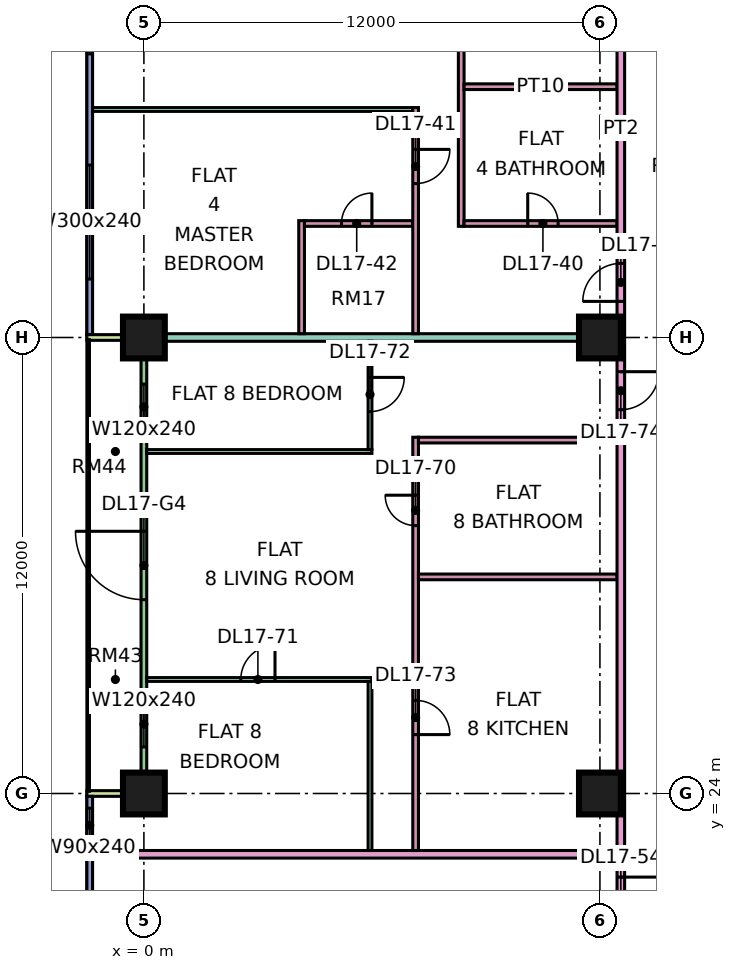
"""IFC4 building model, lengths in metres.
Left out: names, types, materials, properties, quantities, classifications, styles, units other than length and angle.
Written with IfcOpenShell. Run it as: python <this file> out.ifc"""

import sys

from ifc_helpers import new_model, si_unit, direction, frame, frame_2d, origin, origin_2d, place, context, subcontext, project, spatial, rectangle, extrude, element, fill, save


model = new_model("IFC4")
c1 = context("Model", 3, precision=1e-05, world=origin(), true_north=direction((0.0, 1.0)))
c2 = subcontext(c1, "Body", "Model", "MODEL_VIEW")
j1 = project(units=[si_unit("LENGTHUNIT", "METRE"), si_unit("PLANEANGLEUNIT", "RADIAN")], contexts=[c1])
p1 = place(None, origin())
s1 = spatial("IfcSite", under=j1, at=p1, CompositionType="ELEMENT")
p2 = place(p1, origin())
s2 = spatial("IfcBuilding", under=s1, at=p2, CompositionType="ELEMENT")
p3 = place(p2, frame((0.0, 0.0, 78.9)))
s3 = spatial("IfcBuildingStorey", under=s2, at=p3, CompositionType="ELEMENT", Elevation=78.9)
p4 = place(p3, frame((0.0, 24.0, 0.0), z_axis=(0.0, 0.0, 1.0), x_axis=(1.0, 0.0, 0.0)))
e1 = element("IfcColumn", 1, at=p4, inside=s3, PredefinedType="COLUMN", context=c2, shape_type="SweptSolid", body=[
    extrude(rectangle(XDim=1.1, YDim=1.1, at=origin_2d()), origin(), (0.0, 0.0, 1.0), 3.75),
])
p5 = place(p3, frame((0.0, 36.0, 0.0), z_axis=(0.0, 0.0, 1.0), x_axis=(1.0, 0.0, 0.0)))
e2 = element("IfcColumn", 2, at=p5, inside=s3, PredefinedType="COLUMN", context=c2, shape_type="SweptSolid", body=[
    extrude(rectangle(XDim=1.1, YDim=1.1, at=origin_2d()), origin(), (0.0, 0.0, 1.0), 3.75),
])
for number, where, z_axis, x_axis in (
    (3, (12.0, 24.0, 0.0), (0.0, 0.0, 1.0), (1.0, 0.0, 0.0)),
    (4, (12.0, 36.0, 0.0), (0.0, 0.0, 1.0), (1.0, 0.0, 0.0)),
):
    element("IfcColumn", number, at=place(p3, frame(where, z_axis=z_axis, x_axis=x_axis)), inside=s3, PredefinedType="COLUMN", context=c2, shape_type="SweptSolid", body=[
        extrude(rectangle(XDim=1.1, YDim=1.1, at=origin_2d()), origin(), (0.0, 0.0, 1.0), 3.75),
    ])
p6 = place(p3, frame((-1.425, 47.925, 0.0), z_axis=(0.0, 0.0, 1.0), x_axis=(0.0, -1.0, 0.0)))
e5 = element("IfcWall", 5, at=p6, inside=s3, PredefinedType="SOLIDWALL", context=c2, shape_type="SweptSolid", body=[
    extrude(rectangle(XDim=11.85, YDim=0.15, at=frame_2d((5.925, 0.0))), origin(), (0.0, 0.0, 1.0), 3.35),
])
p7 = place(p6, frame((1.462, 0.0, 0.45)))
e6 = element("IfcOpeningElement", 6, at=p7, cuts=e5, PredefinedType="OPENING", context=c2, shape_type="SweptSolid", body=[
    extrude(rectangle(XDim=3.0, YDim=2.4, at=frame_2d((1.5, 1.2))), frame((0.0, 0.085, 0.0), z_axis=(0.0, -1.0, 0.0), x_axis=(1.0, 0.0, 0.0)), (0.0, 0.0, 1.0), 0.17),
])
p8 = place(p6, frame((7.387, 0.0, 0.45)))
e7 = element("IfcOpeningElement", 7, at=p8, cuts=e5, PredefinedType="OPENING", context=c2, shape_type="SweptSolid", body=[
    extrude(rectangle(XDim=3.0, YDim=2.4, at=frame_2d((1.5, 1.2))), frame((0.0, 0.085, 0.0), z_axis=(0.0, -1.0, 0.0), x_axis=(1.0, 0.0, 0.0)), (0.0, 0.0, 1.0), 0.17),
])
p9 = place(p3, frame((0.0, 35.925, 0.0), z_axis=(0.0, 0.0, 1.0), x_axis=(0.0, -1.0, 0.0)))
e8 = element("IfcWall", 8, at=p9, inside=s3, PredefinedType="SOLIDWALL", context=c2, shape_type="SweptSolid", body=[
    extrude(rectangle(XDim=11.85, YDim=0.15, at=frame_2d((5.925, 0.0))), origin(), (0.0, 0.0, 1.0), 3.35),
])
p10 = place(p9, frame((1.15, 0.0, 0.45)))
e9 = element("IfcOpeningElement", 9, at=p10, cuts=e8, PredefinedType="OPENING", context=c2, shape_type="SweptSolid", body=[
    extrude(rectangle(XDim=1.2, YDim=2.4, at=frame_2d((0.6, 1.2))), frame((0.0, 0.085, 0.0), z_axis=(0.0, -1.0, 0.0), x_axis=(1.0, 0.0, 0.0)), (0.0, 0.0, 1.0), 0.17),
])
p11 = place(p9, frame((5.025, 0.0, 0.0)))
e10 = element("IfcOpeningElement", 10, at=p11, cuts=e8, PredefinedType="OPENING", context=c2, shape_type="SweptSolid", body=[
    extrude(rectangle(XDim=1.8, YDim=2.4, at=frame_2d((0.9, 1.2))), frame((0.0, 0.085, 0.0), z_axis=(0.0, -1.0, 0.0), x_axis=(1.0, 0.0, 0.0)), (0.0, 0.0, 1.0), 0.17),
])
p12 = place(p9, frame((9.5, 0.0, 0.45)))
e11 = element("IfcOpeningElement", 11, at=p12, cuts=e8, PredefinedType="OPENING", context=c2, shape_type="SweptSolid", body=[
    extrude(rectangle(XDim=1.2, YDim=2.4, at=frame_2d((0.6, 1.2))), frame((0.0, 0.085, 0.0), z_axis=(0.0, -1.0, 0.0), x_axis=(1.0, 0.0, 0.0)), (0.0, 0.0, 1.0), 0.17),
])
for number, where, z_axis, x_axis in (
    (12, (-1.5, 36.0, 0.0), (0.0, 0.0, 1.0), (1.0, 0.0, 0.0)),
    (13, (-1.5, 24.0, 0.0), (0.0, 0.0, 1.0), (1.0, 0.0, 0.0)),
):
    element("IfcWall", number, at=place(p3, frame(where, z_axis=z_axis, x_axis=x_axis)), inside=s3, PredefinedType="SOLIDWALL", context=c2, shape_type="SweptSolid", body=[
        extrude(rectangle(XDim=1.5, YDim=0.15, at=frame_2d((0.75, 0.0))), origin(), (0.0, 0.0, 1.0), 3.35),
    ])
p13 = place(p3, frame((-1.425, 23.925, 0.0), z_axis=(0.0, 0.0, 1.0), x_axis=(0.0, -1.0, 0.0)))
e14 = element("IfcWall", 14, at=p13, inside=s3, PredefinedType="SOLIDWALL", context=c2, shape_type="SweptSolid", body=[
    extrude(rectangle(XDim=11.425, YDim=0.15, at=frame_2d((5.712, 0.0))), origin(), (0.0, 0.0, 1.0), 3.35),
])
p14 = place(p13, frame((0.312, 0.0, 0.45)))
e15 = element("IfcOpeningElement", 15, at=p14, cuts=e14, PredefinedType="OPENING", context=c2, shape_type="SweptSolid", body=[
    extrude(rectangle(XDim=0.9, YDim=2.4, at=frame_2d((0.45, 1.2))), frame((0.0, 0.085, 0.0), z_axis=(0.0, -1.0, 0.0), x_axis=(1.0, 0.0, 0.0)), (0.0, 0.0, 1.0), 0.17),
])
p15 = place(p13, frame((6.175, 0.0, 0.45)))
e16 = element("IfcOpeningElement", 16, at=p15, cuts=e14, PredefinedType="OPENING", context=c2, shape_type="SweptSolid", body=[
    extrude(rectangle(XDim=3.0, YDim=2.4, at=frame_2d((1.5, 1.2))), frame((0.0, 0.085, 0.0), z_axis=(0.0, -1.0, 0.0), x_axis=(1.0, 0.0, 0.0)), (0.0, 0.0, 1.0), 0.17),
])
p16 = place(p3, frame((-1.35, 22.4, 0.0), z_axis=(0.0, 0.0, 1.0), x_axis=(1.0, 0.0, 0.0)))
e17 = element("IfcWall", 17, at=p16, inside=s3, PredefinedType="PARTITIONING", context=c2, shape_type="SweptSolid", body=[
    extrude(rectangle(XDim=13.8, YDim=0.2, at=frame_2d((6.9, 0.0))), origin(), (0.0, 0.0, 1.0), 3.35),
])
e18 = element("IfcWall", 18, at=p5, inside=s3, PredefinedType="PARTITIONING", context=c2, shape_type="SweptSolid", body=[
    extrude(rectangle(XDim=12.45, YDim=0.2, at=frame_2d((6.225, 0.0))), origin(), (0.0, 0.0, 1.0), 3.35),
])
p17 = place(p3, frame((-1.35, 42.0, 0.0), z_axis=(0.0, 0.0, 1.0), x_axis=(1.0, 0.0, 0.0)))
e19 = element("IfcWall", 19, at=p17, inside=s3, PredefinedType="PARTITIONING", context=c2, shape_type="SweptSolid", body=[
    extrude(rectangle(XDim=8.425, YDim=0.1, at=frame_2d((4.212, 0.0))), origin(), (0.0, 0.0, 1.0), 3.35),
])
p18 = place(p3, frame((0.074, 27.0, 0.0), z_axis=(0.0, 0.0, 1.0), x_axis=(1.0, 0.0, 0.0)))
e20 = element("IfcWall", 20, at=p18, inside=s3, PredefinedType="PARTITIONING", context=c2, shape_type="SweptSolid", body=[
    extrude(rectangle(XDim=5.926, YDim=0.1, at=frame_2d((2.963, 0.0))), origin(), (0.0, 0.0, 1.0), 3.35),
])
p19 = place(p18, frame((2.476, 0.0, 0.0)))
e21 = element("IfcOpeningElement", 21, at=p19, cuts=e20, PredefinedType="OPENING", context=c2, shape_type="SweptSolid", body=[
    extrude(rectangle(XDim=0.9, YDim=2.1, at=frame_2d((0.45, 1.05))), frame((0.0, 0.06, 0.0), z_axis=(0.0, -1.0, 0.0), x_axis=(1.0, 0.0, 0.0)), (0.0, 0.0, 1.0), 0.12),
])
p20 = place(p3, frame((0.074, 33.0, 0.0), z_axis=(0.0, 0.0, 1.0), x_axis=(1.0, 0.0, 0.0)))
e22 = element("IfcWall", 22, at=p20, inside=s3, PredefinedType="PARTITIONING", context=c2, shape_type="SweptSolid", body=[
    extrude(rectangle(XDim=5.926, YDim=0.1, at=frame_2d((2.963, 0.0))), origin(), (0.0, 0.0, 1.0), 3.35),
])
p21 = place(p3, frame((4.15, 36.1, 0.0), z_axis=(0.0, 0.0, 1.0), x_axis=(0.0, 1.0, 0.0)))
e23 = element("IfcWall", 23, at=p21, inside=s3, PredefinedType="PARTITIONING", context=c2, shape_type="SweptSolid", body=[
    extrude(rectangle(XDim=2.975, YDim=0.15, at=frame_2d((1.487, 0.0))), origin(), (0.0, 0.0, 1.0), 3.35),
])
p22 = place(p3, frame((4.225, 39.0, 0.0), z_axis=(0.0, 0.0, 1.0), x_axis=(1.0, 0.0, 0.0)))
e24 = element("IfcWall", 24, at=p22, inside=s3, PredefinedType="PARTITIONING", context=c2, shape_type="SweptSolid", body=[
    extrude(rectangle(XDim=2.85, YDim=0.15, at=frame_2d((1.425, 0.0))), origin(), (0.0, 0.0, 1.0), 3.35),
])
p23 = place(p22, frame((0.975, 0.0, 0.0)))
e25 = element("IfcOpeningElement", 25, at=p23, cuts=e24, PredefinedType="OPENING", context=c2, shape_type="SweptSolid", body=[
    extrude(rectangle(XDim=0.8, YDim=2.1, at=frame_2d((0.4, 1.05))), frame((0.0, 0.085, 0.0), z_axis=(0.0, -1.0, 0.0), x_axis=(1.0, 0.0, 0.0)), (0.0, 0.0, 1.0), 0.17),
])
p24 = place(p3, frame((5.95, 22.5, 0.0), z_axis=(0.0, 0.0, 1.0), x_axis=(0.0, 1.0, 0.0)))
e26 = element("IfcWall", 26, at=p24, inside=s3, PredefinedType="PARTITIONING", context=c2, shape_type="SweptSolid", body=[
    extrude(rectangle(XDim=4.45, YDim=0.1, at=frame_2d((2.225, 0.0))), origin(), (0.0, 0.0, 1.0), 3.35),
])
p25 = place(p3, frame((5.95, 33.05, 0.0), z_axis=(0.0, 0.0, 1.0), x_axis=(0.0, 1.0, 0.0)))
e27 = element("IfcWall", 27, at=p25, inside=s3, PredefinedType="PARTITIONING", context=c2, shape_type="SweptSolid", body=[
    extrude(rectangle(XDim=2.85, YDim=0.1, at=frame_2d((1.425, 0.0))), origin(), (0.0, 0.0, 1.0), 3.35),
])
p26 = place(p25, frame((1.0, 0.0, 0.0)))
e28 = element("IfcOpeningElement", 28, at=p26, cuts=e27, PredefinedType="OPENING", context=c2, shape_type="SweptSolid", body=[
    extrude(rectangle(XDim=0.9, YDim=2.1, at=frame_2d((0.45, 1.05))), frame((0.0, 0.06, 0.0), z_axis=(0.0, -1.0, 0.0), x_axis=(1.0, 0.0, 0.0)), (0.0, 0.0, 1.0), 0.12),
])
p27 = place(p3, frame((7.15, 22.5, 0.0), z_axis=(0.0, 0.0, 1.0), x_axis=(0.0, 1.0, 0.0)))
e29 = element("IfcWall", 29, at=p27, inside=s3, PredefinedType="PARTITIONING", context=c2, shape_type="SweptSolid", body=[
    extrude(rectangle(XDim=10.875, YDim=0.15, at=frame_2d((5.438, 0.0))), origin(), (0.0, 0.0, 1.0), 3.35),
])
p28 = place(p27, frame((8.55, 0.0, 0.0)))
e30 = element("IfcOpeningElement", 30, at=p28, cuts=e29, PredefinedType="OPENING", context=c2, shape_type="SweptSolid", body=[
    extrude(rectangle(XDim=0.8, YDim=2.1, at=frame_2d((0.4, 1.05))), frame((0.0, 0.085, 0.0), z_axis=(0.0, -1.0, 0.0), x_axis=(1.0, 0.0, 0.0)), (0.0, 0.0, 1.0), 0.17),
])
p29 = place(p27, frame((3.05, 0.0, 0.0)))
e31 = element("IfcOpeningElement", 31, at=p29, cuts=e29, PredefinedType="OPENING", context=c2, shape_type="SweptSolid", body=[
    extrude(rectangle(XDim=0.9, YDim=2.1, at=frame_2d((0.45, 1.05))), frame((0.0, 0.085, 0.0), z_axis=(0.0, -1.0, 0.0), x_axis=(1.0, 0.0, 0.0)), (0.0, 0.0, 1.0), 0.17),
])
p30 = place(p3, frame((7.15, 36.1, 0.0), z_axis=(0.0, 0.0, 1.0), x_axis=(0.0, 1.0, 0.0)))
e32 = element("IfcWall", 32, at=p30, inside=s3, PredefinedType="PARTITIONING", context=c2, shape_type="SweptSolid", body=[
    extrude(rectangle(XDim=5.95, YDim=0.15, at=frame_2d((2.975, 0.0))), origin(), (0.0, 0.0, 1.0), 3.35),
])
p31 = place(p30, frame((3.95, 0.0, 0.0)))
e33 = element("IfcOpeningElement", 33, at=p31, cuts=e32, PredefinedType="OPENING", context=c2, shape_type="SweptSolid", body=[
    extrude(rectangle(XDim=0.9, YDim=2.1, at=frame_2d((0.45, 1.05))), frame((0.0, 0.085, 0.0), z_axis=(0.0, -1.0, 0.0), x_axis=(1.0, 0.0, 0.0)), (0.0, 0.0, 1.0), 0.17),
])
for number, where, z_axis, x_axis in (
    (34, (7.225, 29.7, 0.0), (0.0, 0.0, 1.0), (1.0, 0.0, 0.0)),
    (35, (7.225, 33.3, 0.0), (0.0, 0.0, 1.0), (1.0, 0.0, 0.0)),
):
    element("IfcWall", number, at=place(p3, frame(where, z_axis=z_axis, x_axis=x_axis)), inside=s3, PredefinedType="PARTITIONING", context=c2, shape_type="SweptSolid", body=[
        extrude(rectangle(XDim=5.225, YDim=0.15, at=frame_2d((2.612, 0.0))), origin(), (0.0, 0.0, 1.0), 3.35),
    ])
p32 = place(p3, frame((8.35, 38.925, 0.0), z_axis=(0.0, 0.0, 1.0), x_axis=(0.0, 1.0, 0.0)))
e36 = element("IfcWall", 36, at=p32, inside=s3, PredefinedType="PARTITIONING", context=c2, shape_type="SweptSolid", body=[
    extrude(rectangle(XDim=8.975, YDim=0.15, at=frame_2d((4.487, 0.0))), origin(), (0.0, 0.0, 1.0), 3.35),
])
p33 = place(p32, frame((5.925, 0.0, 0.0)))
e37 = element("IfcOpeningElement", 37, at=p33, cuts=e36, PredefinedType="OPENING", context=c2, shape_type="SweptSolid", body=[
    extrude(rectangle(XDim=0.9, YDim=2.1, at=frame_2d((0.45, 1.05))), frame((0.0, 0.085, 0.0), z_axis=(0.0, -1.0, 0.0), x_axis=(1.0, 0.0, 0.0)), (0.0, 0.0, 1.0), 0.17),
])
p34 = place(p3, frame((8.425, 39.0, 0.0), z_axis=(0.0, 0.0, 1.0), x_axis=(1.0, 0.0, 0.0)))
e38 = element("IfcWall", 38, at=p34, inside=s3, PredefinedType="PARTITIONING", context=c2, shape_type="SweptSolid", body=[
    extrude(rectangle(XDim=4.025, YDim=0.15, at=frame_2d((2.012, 0.0))), origin(), (0.0, 0.0, 1.0), 3.35),
])
p35 = place(p34, frame((1.675, 0.0, 0.0)))
e39 = element("IfcOpeningElement", 39, at=p35, cuts=e38, PredefinedType="OPENING", context=c2, shape_type="SweptSolid", body=[
    extrude(rectangle(XDim=0.8, YDim=2.1, at=frame_2d((0.4, 1.05))), frame((0.0, 0.085, 0.0), z_axis=(0.0, -1.0, 0.0), x_axis=(1.0, 0.0, 0.0)), (0.0, 0.0, 1.0), 0.17),
])
p36 = place(p3, frame((8.425, 42.6, 0.0), z_axis=(0.0, 0.0, 1.0), x_axis=(1.0, 0.0, 0.0)))
e40 = element("IfcWall", 40, at=p36, inside=s3, PredefinedType="PARTITIONING", context=c2, shape_type="SweptSolid", body=[
    extrude(rectangle(XDim=4.025, YDim=0.15, at=frame_2d((2.012, 0.0))), origin(), (0.0, 0.0, 1.0), 3.35),
])
p37 = place(p3, frame((12.55, 20.0, 0.0), z_axis=(0.0, 0.0, 1.0), x_axis=(0.0, 1.0, 0.0)))
e41 = element("IfcWall", 41, at=p37, inside=s3, PredefinedType="PARTITIONING", context=c2, shape_type="SweptSolid", body=[
    extrude(rectangle(XDim=43.0, YDim=0.2, at=frame_2d((21.5, 0.0))), origin(), (0.0, 0.0, 1.0), 3.35),
])
p38 = place(p37, frame((16.95, 0.0, 0.0)))
e42 = element("IfcOpeningElement", 42, at=p38, cuts=e41, PredefinedType="OPENING", context=c2, shape_type="SweptSolid", body=[
    extrude(rectangle(XDim=1.0, YDim=2.1, at=frame_2d((0.5, 1.05))), frame((0.0, 0.11, 0.0), z_axis=(0.0, -1.0, 0.0), x_axis=(1.0, 0.0, 0.0)), (0.0, 0.0, 1.0), 0.22),
])
p39 = place(p37, frame((35.25, 0.0, 0.0)))
e43 = element("IfcOpeningElement", 43, at=p39, cuts=e41, PredefinedType="OPENING", context=c2, shape_type="SweptSolid", body=[
    extrude(rectangle(XDim=1.0, YDim=2.1, at=frame_2d((0.5, 1.05))), frame((0.0, 0.11, 0.0), z_axis=(0.0, -1.0, 0.0), x_axis=(1.0, 0.0, 0.0)), (0.0, 0.0, 1.0), 0.22),
])
p40 = place(p37, frame((0.6, 0.0, 0.0)))
e44 = element("IfcOpeningElement", 44, at=p40, cuts=e41, PredefinedType="OPENING", context=c2, shape_type="SweptSolid", body=[
    extrude(rectangle(XDim=1.2, YDim=2.1, at=frame_2d((0.6, 1.05))), frame((0.0, 0.11, 0.0), z_axis=(0.0, -1.0, 0.0), x_axis=(1.0, 0.0, 0.0)), (0.0, 0.0, 1.0), 0.22),
])
p41 = place(p37, frame((14.1, 0.0, 0.0)))
e45 = element("IfcOpeningElement", 45, at=p41, cuts=e41, PredefinedType="OPENING", context=c2, shape_type="SweptSolid", body=[
    extrude(rectangle(XDim=1.0, YDim=2.1, at=frame_2d((0.5, 1.05))), frame((0.0, 0.11, 0.0), z_axis=(0.0, -1.0, 0.0), x_axis=(1.0, 0.0, 0.0)), (0.0, 0.0, 1.0), 0.22),
])
p42 = place(p7, origin())
e46 = element("IfcWindow", 46, at=p42, inside=s3, PartitioningType="SINGLE_PANEL", PredefinedType="WINDOW", context=c2, shape_type="SweptSolid", body=[
    extrude(rectangle(XDim=3.0, YDim=2.4, at=frame_2d((1.5, 1.2))), frame((0.0, 0.03, 0.0), z_axis=(0.0, -1.0, 0.0), x_axis=(1.0, 0.0, 0.0)), (0.0, 0.0, 1.0), 0.06),
])
fill(e6, e46)
p43 = place(p8, origin())
e47 = element("IfcWindow", 47, at=p43, inside=s3, PartitioningType="SINGLE_PANEL", PredefinedType="WINDOW", context=c2, shape_type="SweptSolid", body=[
    extrude(rectangle(XDim=3.0, YDim=2.4, at=frame_2d((1.5, 1.2))), frame((0.0, 0.03, 0.0), z_axis=(0.0, -1.0, 0.0), x_axis=(1.0, 0.0, 0.0)), (0.0, 0.0, 1.0), 0.06),
])
fill(e7, e47)
p44 = place(p10, origin())
e48 = element("IfcWindow", 48, at=p44, inside=s3, PartitioningType="SINGLE_PANEL", PredefinedType="WINDOW", context=c2, shape_type="SweptSolid", body=[
    extrude(rectangle(XDim=1.2, YDim=2.4, at=frame_2d((0.6, 1.2))), frame((0.0, 0.03, 0.0), z_axis=(0.0, -1.0, 0.0), x_axis=(1.0, 0.0, 0.0)), (0.0, 0.0, 1.0), 0.06),
])
fill(e9, e48)
p45 = place(p11, frame((1.8, 0.0, 0.0), z_axis=(0.0, 0.0, 1.0), x_axis=(-1.0, 0.0, 0.0)))
e49 = element("IfcDoor", 49, at=p45, inside=s3, OperationType="DOUBLE_DOOR_SINGLE_SWING", PredefinedType="DOOR", context=c2, shape_type="SweptSolid", body=[
    extrude(rectangle(XDim=1.8, YDim=2.4, at=frame_2d((0.9, 1.2))), frame((0.0, 0.025, 0.0), z_axis=(0.0, -1.0, 0.0), x_axis=(1.0, 0.0, 0.0)), (0.0, 0.0, 1.0), 0.05),
])
fill(e10, e49)
p46 = place(p12, origin())
e50 = element("IfcWindow", 50, at=p46, inside=s3, PartitioningType="SINGLE_PANEL", PredefinedType="WINDOW", context=c2, shape_type="SweptSolid", body=[
    extrude(rectangle(XDim=1.2, YDim=2.4, at=frame_2d((0.6, 1.2))), frame((0.0, 0.03, 0.0), z_axis=(0.0, -1.0, 0.0), x_axis=(1.0, 0.0, 0.0)), (0.0, 0.0, 1.0), 0.06),
])
fill(e11, e50)
p47 = place(p14, origin())
e51 = element("IfcWindow", 51, at=p47, inside=s3, PartitioningType="SINGLE_PANEL", PredefinedType="WINDOW", context=c2, shape_type="SweptSolid", body=[
    extrude(rectangle(XDim=0.9, YDim=2.4, at=frame_2d((0.45, 1.2))), frame((0.0, 0.03, 0.0), z_axis=(0.0, -1.0, 0.0), x_axis=(1.0, 0.0, 0.0)), (0.0, 0.0, 1.0), 0.06),
])
fill(e15, e51)
p48 = place(p35, origin())
e52 = element("IfcDoor", 52, at=p48, inside=s3, OperationType="SINGLE_SWING_LEFT", PredefinedType="DOOR", context=c2, shape_type="SweptSolid", body=[
    extrude(rectangle(XDim=0.8, YDim=2.1, at=frame_2d((0.4, 1.05))), frame((0.0, 0.025, 0.0), z_axis=(0.0, -1.0, 0.0), x_axis=(1.0, 0.0, 0.0)), (0.0, 0.0, 1.0), 0.05),
])
fill(e39, e52)
p49 = place(p31, origin())
e53 = element("IfcDoor", 53, at=p49, inside=s3, OperationType="SINGLE_SWING_RIGHT", PredefinedType="DOOR", context=c2, shape_type="SweptSolid", body=[
    extrude(rectangle(XDim=0.9, YDim=2.1, at=frame_2d((0.45, 1.05))), frame((0.0, 0.025, 0.0), z_axis=(0.0, -1.0, 0.0), x_axis=(1.0, 0.0, 0.0)), (0.0, 0.0, 1.0), 0.05),
])
fill(e33, e53)
p50 = place(p23, frame((0.8, 0.0, 0.0), z_axis=(0.0, 0.0, 1.0), x_axis=(-1.0, 0.0, 0.0)))
e54 = element("IfcDoor", 54, at=p50, inside=s3, OperationType="SINGLE_SWING_RIGHT", PredefinedType="DOOR", context=c2, shape_type="SweptSolid", body=[
    extrude(rectangle(XDim=0.8, YDim=2.1, at=frame_2d((0.4, 1.05))), frame((0.0, 0.025, 0.0), z_axis=(0.0, -1.0, 0.0), x_axis=(1.0, 0.0, 0.0)), (0.0, 0.0, 1.0), 0.05),
])
fill(e25, e54)
p51 = place(p38, origin())
e55 = element("IfcDoor", 55, at=p51, inside=s3, OperationType="SINGLE_SWING_LEFT", PredefinedType="DOOR", context=c2, shape_type="SweptSolid", body=[
    extrude(rectangle(XDim=1.0, YDim=2.1, at=frame_2d((0.5, 1.05))), frame((0.0, 0.025, 0.0), z_axis=(0.0, -1.0, 0.0), x_axis=(1.0, 0.0, 0.0)), (0.0, 0.0, 1.0), 0.05),
])
fill(e42, e55)
p52 = place(p40, origin())
e56 = element("IfcDoor", 56, at=p52, inside=s3, OperationType="SINGLE_SWING_RIGHT", PredefinedType="DOOR", context=c2, shape_type="SweptSolid", body=[
    extrude(rectangle(XDim=1.2, YDim=2.1, at=frame_2d((0.6, 1.05))), frame((0.0, 0.025, 0.0), z_axis=(0.0, -1.0, 0.0), x_axis=(1.0, 0.0, 0.0)), (0.0, 0.0, 1.0), 0.05),
])
fill(e44, e56)
p53 = place(p28, frame((0.8, 0.0, 0.0), z_axis=(0.0, 0.0, 1.0), x_axis=(-1.0, 0.0, 0.0)))
e57 = element("IfcDoor", 57, at=p53, inside=s3, OperationType="SINGLE_SWING_RIGHT", PredefinedType="DOOR", context=c2, shape_type="SweptSolid", body=[
    extrude(rectangle(XDim=0.8, YDim=2.1, at=frame_2d((0.4, 1.05))), frame((0.0, 0.025, 0.0), z_axis=(0.0, -1.0, 0.0), x_axis=(1.0, 0.0, 0.0)), (0.0, 0.0, 1.0), 0.05),
])
fill(e30, e57)
p54 = place(p19, frame((0.9, 0.0, 0.0), z_axis=(0.0, 0.0, 1.0), x_axis=(-1.0, 0.0, 0.0)))
e58 = element("IfcDoor", 58, at=p54, inside=s3, OperationType="SINGLE_SWING_RIGHT", PredefinedType="DOOR", context=c2, shape_type="SweptSolid", body=[
    extrude(rectangle(XDim=0.9, YDim=2.1, at=frame_2d((0.45, 1.05))), frame((0.0, 0.025, 0.0), z_axis=(0.0, -1.0, 0.0), x_axis=(1.0, 0.0, 0.0)), (0.0, 0.0, 1.0), 0.05),
])
fill(e21, e58)
p55 = place(p26, origin())
e59 = element("IfcDoor", 59, at=p55, inside=s3, OperationType="SINGLE_SWING_RIGHT", PredefinedType="DOOR", context=c2, shape_type="SweptSolid", body=[
    extrude(rectangle(XDim=0.9, YDim=2.1, at=frame_2d((0.45, 1.05))), frame((0.0, 0.025, 0.0), z_axis=(0.0, -1.0, 0.0), x_axis=(1.0, 0.0, 0.0)), (0.0, 0.0, 1.0), 0.05),
])
fill(e28, e59)
p56 = place(p29, frame((0.9, 0.0, 0.0), z_axis=(0.0, 0.0, 1.0), x_axis=(-1.0, 0.0, 0.0)))
e60 = element("IfcDoor", 60, at=p56, inside=s3, OperationType="SINGLE_SWING_LEFT", PredefinedType="DOOR", context=c2, shape_type="SweptSolid", body=[
    extrude(rectangle(XDim=0.9, YDim=2.1, at=frame_2d((0.45, 1.05))), frame((0.0, 0.025, 0.0), z_axis=(0.0, -1.0, 0.0), x_axis=(1.0, 0.0, 0.0)), (0.0, 0.0, 1.0), 0.05),
])
fill(e31, e60)
p57 = place(p41, origin())
e61 = element("IfcDoor", 61, at=p57, inside=s3, OperationType="SINGLE_SWING_RIGHT", PredefinedType="DOOR", context=c2, shape_type="SweptSolid", body=[
    extrude(rectangle(XDim=1.0, YDim=2.1, at=frame_2d((0.5, 1.05))), frame((0.0, 0.025, 0.0), z_axis=(0.0, -1.0, 0.0), x_axis=(1.0, 0.0, 0.0)), (0.0, 0.0, 1.0), 0.05),
])
fill(e45, e61)
save(model, sys.argv[1])
